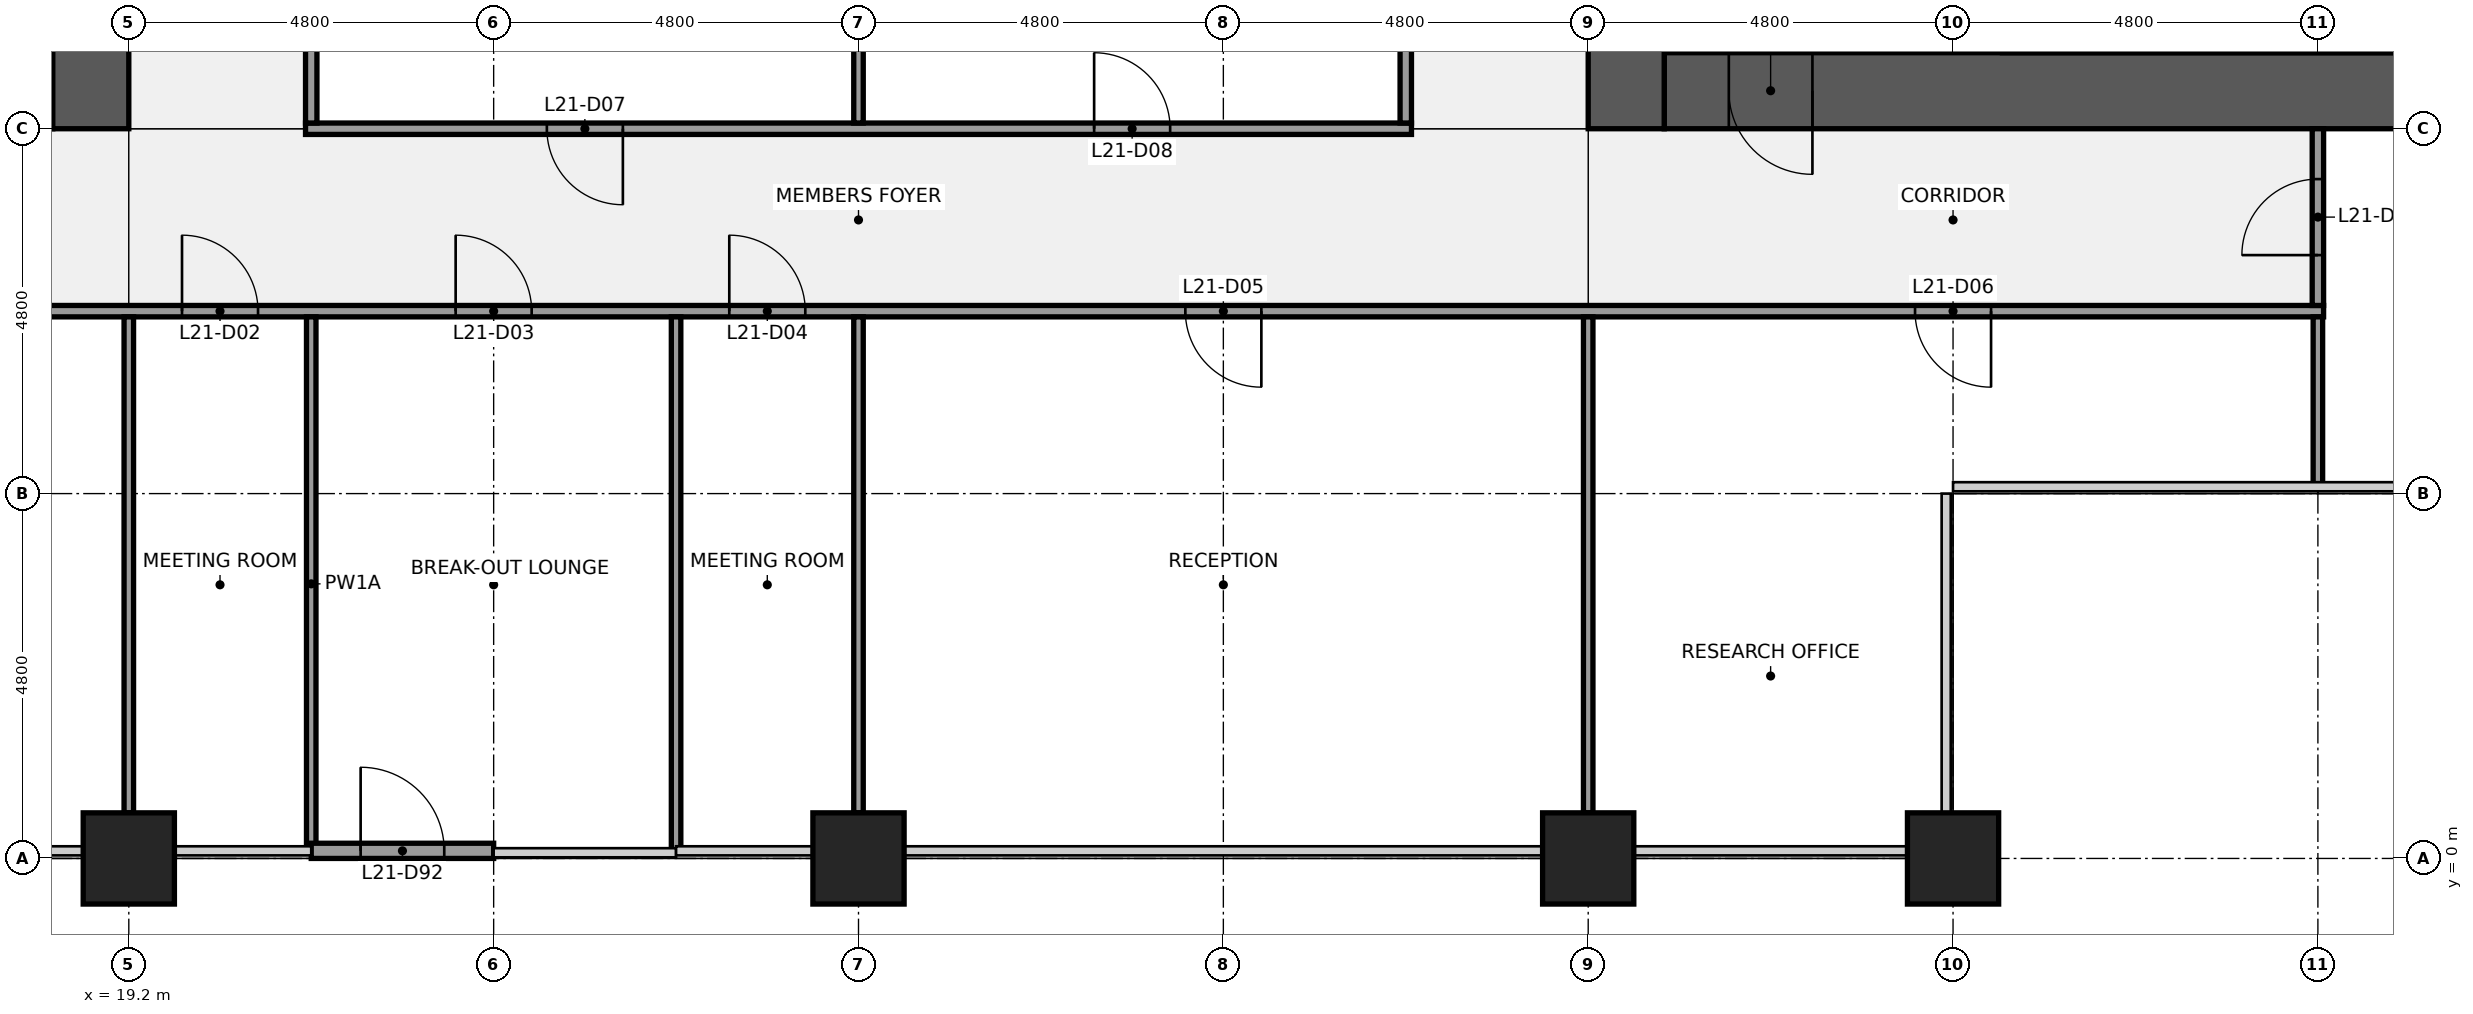
"""IFC4 building model, lengths in metres.
Left out: names, types, materials, properties, quantities, classifications, styles, units other than length and angle.
Written with IfcOpenShell. Run it as: python <this file> out.ifc"""

import sys

from ifc_helpers import new_model, si_unit, direction, frame, frame_2d, origin, origin_2d, place, context, subcontext, project, spatial, rectangle, extrude, element, fill, save


model = new_model("IFC4")
c1 = context("Model", 3, precision=1e-05, world=origin(), true_north=direction((0.0, 1.0)))
c2 = subcontext(c1, "Body", "Model", "MODEL_VIEW")
j1 = project(units=[si_unit("LENGTHUNIT", "METRE"), si_unit("PLANEANGLEUNIT", "RADIAN")], contexts=[c1])
p1 = place(None, origin())
s1 = spatial("IfcSite", under=j1, at=p1, CompositionType="ELEMENT")
p2 = place(p1, origin())
s2 = spatial("IfcBuilding", under=s1, at=p2, CompositionType="ELEMENT")
p3 = place(p2, frame((0.0, 0.0, 104.1)))
s3 = spatial("IfcBuildingStorey", under=s2, at=p3, CompositionType="ELEMENT", Elevation=104.1)
for number, where, z_axis, x_axis in (
    (1, (19.2, 0.0, 0.0), (0.0, 0.0, 1.0), (1.0, 0.0, 0.0)),
    (2, (28.8, 0.0, 0.0), (0.0, 0.0, 1.0), (1.0, 0.0, 0.0)),
    (3, (38.4, 0.0, 0.0), (0.0, 0.0, 1.0), (1.0, 0.0, 0.0)),
    (4, (43.2, 0.0, 0.0), (0.0, 0.0, 1.0), (1.0, 0.0, 0.0)),
):
    element("IfcColumn", number, at=place(p3, frame(where, z_axis=z_axis, x_axis=x_axis)), inside=s3, PredefinedType="COLUMN", context=c2, shape_type="SweptSolid", body=[
        extrude(rectangle(XDim=1.2, YDim=1.2, at=origin_2d()), origin(), (0.0, 0.0, 1.0), 4.0),
    ])
p4 = place(p3, frame((18.2, 10.1, 0.0), z_axis=(0.0, 0.0, 1.0), x_axis=(-1.0, 0.0, 0.0)))
e5 = element("IfcWall", 5, at=p4, inside=s3, PredefinedType="SHEAR", context=c2, shape_type="SweptSolid", body=[
    extrude(rectangle(XDim=8.6, YDim=1.0, at=frame_2d((4.3, 0.0))), origin(), (0.0, 0.0, 1.0), 3.84),
])
p5 = place(p4, frame((0.85, 0.0, 0.0)))
e6 = element("IfcOpeningElement", 6, at=p5, cuts=e5, PredefinedType="OPENING", context=c2, shape_type="SweptSolid", body=[
    extrude(rectangle(XDim=1.1, YDim=2.1, at=frame_2d((0.55, 1.05))), frame((0.0, 0.51, 0.0), z_axis=(0.0, -1.0, 0.0), x_axis=(1.0, 0.0, 0.0)), (0.0, 0.0, 1.0), 1.02),
])
p6 = place(p3, frame((18.7, 38.4, 0.0), z_axis=(0.0, 0.0, 1.0), x_axis=(0.0, -1.0, 0.0)))
e7 = element("IfcWall", 7, at=p6, inside=s3, PredefinedType="SHEAR", context=c2, shape_type="SweptSolid", body=[
    extrude(rectangle(XDim=28.8, YDim=1.0, at=frame_2d((14.4, 0.0))), origin(), (0.0, 0.0, 1.0), 3.84),
])
p7 = place(p6, frame((18.3, 0.0, 0.0)))
e8 = element("IfcOpeningElement", 8, at=p7, cuts=e7, PredefinedType="OPENING", context=c2, shape_type="SweptSolid", body=[
    extrude(rectangle(XDim=1.8, YDim=2.1, at=frame_2d((0.9, 1.05))), frame((0.0, 0.51, 0.0), z_axis=(0.0, -1.0, 0.0), x_axis=(1.0, 0.0, 0.0)), (0.0, 0.0, 1.0), 1.02),
])
p8 = place(p6, frame((8.7, 0.0, 0.0)))
e9 = element("IfcOpeningElement", 9, at=p8, cuts=e7, PredefinedType="OPENING", context=c2, shape_type="SweptSolid", body=[
    extrude(rectangle(XDim=1.8, YDim=2.1, at=frame_2d((0.9, 1.05))), frame((0.0, 0.51, 0.0), z_axis=(0.0, -1.0, 0.0), x_axis=(1.0, 0.0, 0.0)), (0.0, 0.0, 1.0), 1.02),
])
p9 = place(p3, frame((52.8, 10.1, 0.0), z_axis=(0.0, 0.0, 1.0), x_axis=(-1.0, 0.0, 0.0)))
e10 = element("IfcWall", 10, at=p9, inside=s3, PredefinedType="SHEAR", context=c2, shape_type="SweptSolid", body=[
    extrude(rectangle(XDim=13.4, YDim=1.0, at=frame_2d((6.7, 0.0))), origin(), (0.0, 0.0, 1.0), 3.84),
])
p10 = place(p9, frame((11.45, 0.0, 0.0)))
e11 = element("IfcOpeningElement", 11, at=p10, cuts=e10, PredefinedType="OPENING", context=c2, shape_type="SweptSolid", body=[
    extrude(rectangle(XDim=1.1, YDim=2.1, at=frame_2d((0.55, 1.05))), frame((0.0, 0.51, 0.0), z_axis=(0.0, -1.0, 0.0), x_axis=(1.0, 0.0, 0.0)), (0.0, 0.0, 1.0), 1.02),
])
p11 = place(p3, frame((38.9, 9.6, 0.0), z_axis=(0.0, 0.0, 1.0), x_axis=(0.0, 1.0, 0.0)))
e12 = element("IfcWall", 12, at=p11, inside=s3, PredefinedType="SHEAR", context=c2, shape_type="SweptSolid", body=[
    extrude(rectangle(XDim=28.8, YDim=1.0, at=frame_2d((14.4, 0.0))), origin(), (0.0, 0.0, 1.0), 3.84),
])
p12 = place(p11, frame((8.7, 0.0, 0.0)))
e13 = element("IfcOpeningElement", 13, at=p12, cuts=e12, PredefinedType="OPENING", context=c2, shape_type="SweptSolid", body=[
    extrude(rectangle(XDim=1.8, YDim=2.1, at=frame_2d((0.9, 1.05))), frame((0.0, 0.51, 0.0), z_axis=(0.0, -1.0, 0.0), x_axis=(1.0, 0.0, 0.0)), (0.0, 0.0, 1.0), 1.02),
])
p13 = place(p11, frame((18.3, 0.0, 0.0)))
e14 = element("IfcOpeningElement", 14, at=p13, cuts=e12, PredefinedType="OPENING", context=c2, shape_type="SweptSolid", body=[
    extrude(rectangle(XDim=1.8, YDim=2.1, at=frame_2d((0.9, 1.05))), frame((0.0, 0.51, 0.0), z_axis=(0.0, -1.0, 0.0), x_axis=(1.0, 0.0, 0.0)), (0.0, 0.0, 1.0), 1.02),
])
p14 = place(p3, frame((43.85, 10.7, 0.0), z_axis=(0.0, 0.0, 1.0), x_axis=(1.0, 0.0, 0.0)))
e15 = element("IfcWall", 15, at=p14, inside=s3, PredefinedType="SHEAR", context=c2, shape_type="SweptSolid", body=[
    extrude(rectangle(XDim=7.5, YDim=0.2, at=frame_2d((3.75, 0.0))), origin(), (0.0, 0.0, 1.0), 3.84),
])
p15 = place(p3, frame((9.7, 7.2, 0.0), z_axis=(0.0, 0.0, 1.0), x_axis=(1.0, 0.0, 0.0)))
e16 = element("IfcWall", 16, at=p15, inside=s3, PredefinedType="PARTITIONING", context=c2, shape_type="SweptSolid", body=[
    extrude(rectangle(XDim=38.375, YDim=0.15, at=frame_2d((19.188, 0.0))), origin(), (0.0, 0.0, 1.0), 2.936),
])
p16 = place(p15, frame((4.25, 0.0, 0.0)))
e17 = element("IfcOpeningElement", 17, at=p16, cuts=e16, PredefinedType="OPENING", context=c2, shape_type="SweptSolid", body=[
    extrude(rectangle(XDim=1.0, YDim=2.1, at=frame_2d((0.5, 1.05))), frame((0.0, 0.085, 0.0), z_axis=(0.0, -1.0, 0.0), x_axis=(1.0, 0.0, 0.0)), (0.0, 0.0, 1.0), 0.17),
])
p17 = place(p15, frame((10.2, 0.0, 0.0)))
e18 = element("IfcOpeningElement", 18, at=p17, cuts=e16, PredefinedType="OPENING", context=c2, shape_type="SweptSolid", body=[
    extrude(rectangle(XDim=1.0, YDim=2.1, at=frame_2d((0.5, 1.05))), frame((0.0, 0.085, 0.0), z_axis=(0.0, -1.0, 0.0), x_axis=(1.0, 0.0, 0.0)), (0.0, 0.0, 1.0), 0.17),
])
p18 = place(p15, frame((13.8, 0.0, 0.0)))
e19 = element("IfcOpeningElement", 19, at=p18, cuts=e16, PredefinedType="OPENING", context=c2, shape_type="SweptSolid", body=[
    extrude(rectangle(XDim=1.0, YDim=2.1, at=frame_2d((0.5, 1.05))), frame((0.0, 0.085, 0.0), z_axis=(0.0, -1.0, 0.0), x_axis=(1.0, 0.0, 0.0)), (0.0, 0.0, 1.0), 0.17),
])
p19 = place(p15, frame((17.4, 0.0, 0.0)))
e20 = element("IfcOpeningElement", 20, at=p19, cuts=e16, PredefinedType="OPENING", context=c2, shape_type="SweptSolid", body=[
    extrude(rectangle(XDim=1.0, YDim=2.1, at=frame_2d((0.5, 1.05))), frame((0.0, 0.085, 0.0), z_axis=(0.0, -1.0, 0.0), x_axis=(1.0, 0.0, 0.0)), (0.0, 0.0, 1.0), 0.17),
])
p20 = place(p15, frame((23.4, 0.0, 0.0)))
e21 = element("IfcOpeningElement", 21, at=p20, cuts=e16, PredefinedType="OPENING", context=c2, shape_type="SweptSolid", body=[
    extrude(rectangle(XDim=1.0, YDim=2.1, at=frame_2d((0.5, 1.05))), frame((0.0, 0.085, 0.0), z_axis=(0.0, -1.0, 0.0), x_axis=(1.0, 0.0, 0.0)), (0.0, 0.0, 1.0), 0.17),
])
p21 = place(p15, frame((33.0, 0.0, 0.0)))
e22 = element("IfcOpeningElement", 22, at=p21, cuts=e16, PredefinedType="OPENING", context=c2, shape_type="SweptSolid", body=[
    extrude(rectangle(XDim=1.0, YDim=2.1, at=frame_2d((0.5, 1.05))), frame((0.0, 0.085, 0.0), z_axis=(0.0, -1.0, 0.0), x_axis=(1.0, 0.0, 0.0)), (0.0, 0.0, 1.0), 0.17),
])
p22 = place(p3, frame((21.525, 9.6, 0.0), z_axis=(0.0, 0.0, 1.0), x_axis=(1.0, 0.0, 0.0)))
e23 = element("IfcWall", 23, at=p22, inside=s3, PredefinedType="PARTITIONING", context=c2, shape_type="SweptSolid", body=[
    extrude(rectangle(XDim=14.55, YDim=0.15, at=frame_2d((7.275, 0.0))), origin(), (0.0, 0.0, 1.0), 2.936),
])
p23 = place(p22, frame((3.175, 0.0, 0.0)))
e24 = element("IfcOpeningElement", 24, at=p23, cuts=e23, PredefinedType="OPENING", context=c2, shape_type="SweptSolid", body=[
    extrude(rectangle(XDim=1.0, YDim=2.1, at=frame_2d((0.5, 1.05))), frame((0.0, 0.085, 0.0), z_axis=(0.0, -1.0, 0.0), x_axis=(1.0, 0.0, 0.0)), (0.0, 0.0, 1.0), 0.17),
])
p24 = place(p22, frame((10.375, 0.0, 0.0)))
e25 = element("IfcOpeningElement", 25, at=p24, cuts=e23, PredefinedType="OPENING", context=c2, shape_type="SweptSolid", body=[
    extrude(rectangle(XDim=1.0, YDim=2.1, at=frame_2d((0.5, 1.05))), frame((0.0, 0.085, 0.0), z_axis=(0.0, -1.0, 0.0), x_axis=(1.0, 0.0, 0.0)), (0.0, 0.0, 1.0), 0.17),
])
p25 = place(p3, frame((19.2, 0.6, 0.0), z_axis=(0.0, 0.0, 1.0), x_axis=(0.0, 1.0, 0.0)))
e26 = element("IfcWall", 26, at=p25, inside=s3, PredefinedType="PARTITIONING", context=c2, shape_type="SweptSolid", body=[
    extrude(rectangle(XDim=6.525, YDim=0.125, at=frame_2d((3.262, 0.0))), origin(), (0.0, 0.0, 1.0), 2.936),
])
p26 = place(p3, frame((21.6, 0.1, 0.0), z_axis=(0.0, 0.0, 1.0), x_axis=(0.0, 1.0, 0.0)))
e27 = element("IfcWall", 27, at=p26, inside=s3, PredefinedType="PARTITIONING", context=c2, shape_type="SweptSolid", body=[
    extrude(rectangle(XDim=7.025, YDim=0.125, at=frame_2d((3.512, 0.0))), origin(), (0.0, 0.0, 1.0), 2.936),
])
p27 = place(p3, frame((21.6, 9.675, 0.0), z_axis=(0.0, 0.0, 1.0), x_axis=(0.0, 1.0, 0.0)))
e28 = element("IfcWall", 28, at=p27, inside=s3, PredefinedType="PARTITIONING", context=c2, shape_type="SweptSolid", body=[
    extrude(rectangle(XDim=4.65, YDim=0.15, at=frame_2d((2.325, 0.0))), origin(), (0.0, 0.0, 1.0), 2.936),
])
p28 = place(p3, frame((26.4, 0.1, 0.0), z_axis=(0.0, 0.0, 1.0), x_axis=(0.0, 1.0, 0.0)))
e29 = element("IfcWall", 29, at=p28, inside=s3, PredefinedType="PARTITIONING", context=c2, shape_type="SweptSolid", body=[
    extrude(rectangle(XDim=7.025, YDim=0.125, at=frame_2d((3.512, 0.0))), origin(), (0.0, 0.0, 1.0), 2.936),
])
p29 = place(p3, frame((28.8, 0.6, 0.0), z_axis=(0.0, 0.0, 1.0), x_axis=(0.0, 1.0, 0.0)))
e30 = element("IfcWall", 30, at=p29, inside=s3, PredefinedType="PARTITIONING", context=c2, shape_type="SweptSolid", body=[
    extrude(rectangle(XDim=6.525, YDim=0.125, at=frame_2d((3.262, 0.0))), origin(), (0.0, 0.0, 1.0), 2.936),
])
p30 = place(p3, frame((28.8, 9.675, 0.0), z_axis=(0.0, 0.0, 1.0), x_axis=(0.0, 1.0, 0.0)))
e31 = element("IfcWall", 31, at=p30, inside=s3, PredefinedType="PARTITIONING", context=c2, shape_type="SweptSolid", body=[
    extrude(rectangle(XDim=4.662, YDim=0.125, at=frame_2d((2.331, 0.0))), origin(), (0.0, 0.0, 1.0), 2.936),
])
p31 = place(p3, frame((36.0, 9.675, 0.0), z_axis=(0.0, 0.0, 1.0), x_axis=(0.0, 1.0, 0.0)))
e32 = element("IfcWall", 32, at=p31, inside=s3, PredefinedType="PARTITIONING", context=c2, shape_type="SweptSolid", body=[
    extrude(rectangle(XDim=4.65, YDim=0.15, at=frame_2d((2.325, 0.0))), origin(), (0.0, 0.0, 1.0), 2.936),
])
p32 = place(p3, frame((38.4, 0.6, 0.0), z_axis=(0.0, 0.0, 1.0), x_axis=(0.0, 1.0, 0.0)))
e33 = element("IfcWall", 33, at=p32, inside=s3, PredefinedType="PARTITIONING", context=c2, shape_type="SweptSolid", body=[
    extrude(rectangle(XDim=6.525, YDim=0.125, at=frame_2d((3.262, 0.0))), origin(), (0.0, 0.0, 1.0), 2.936),
])
p33 = place(p3, frame((48.0, 4.9, 0.0), z_axis=(0.0, 0.0, 1.0), x_axis=(0.0, 1.0, 0.0)))
e34 = element("IfcWall", 34, at=p33, inside=s3, PredefinedType="PARTITIONING", context=c2, shape_type="SweptSolid", body=[
    extrude(rectangle(XDim=2.225, YDim=0.125, at=frame_2d((1.113, 0.0))), origin(), (0.0, 0.0, 1.0), 2.936),
])
p34 = place(p3, frame((48.0, 7.275, 0.0), z_axis=(0.0, 0.0, 1.0), x_axis=(0.0, 1.0, 0.0)))
e35 = element("IfcWall", 35, at=p34, inside=s3, PredefinedType="PARTITIONING", context=c2, shape_type="SweptSolid", body=[
    extrude(rectangle(XDim=2.325, YDim=0.15, at=frame_2d((1.163, 0.0))), origin(), (0.0, 0.0, 1.0), 2.936),
])
p35 = place(p34, frame((0.663, 0.0, 0.0)))
e36 = element("IfcOpeningElement", 36, at=p35, cuts=e35, PredefinedType="OPENING", context=c2, shape_type="SweptSolid", body=[
    extrude(rectangle(XDim=1.0, YDim=2.1, at=frame_2d((0.5, 1.05))), frame((0.0, 0.085, 0.0), z_axis=(0.0, -1.0, 0.0), x_axis=(1.0, 0.0, 0.0)), (0.0, 0.0, 1.0), 0.17),
])
p36 = place(p3, frame((21.6, 0.1, 0.0), z_axis=(0.0, 0.0, 1.0), x_axis=(1.0, 0.0, 0.0)))
e37 = element("IfcWall", 37, at=p36, inside=s3, PredefinedType="SOLIDWALL", context=c2, shape_type="SweptSolid", body=[
    extrude(rectangle(XDim=2.4, YDim=0.2, at=frame_2d((1.2, 0.0))), origin(), (0.0, 0.0, 1.0), 3.314),
])
p37 = place(p36, frame((0.65, 0.0, 0.0)))
e38 = element("IfcOpeningElement", 38, at=p37, cuts=e37, PredefinedType="OPENING", context=c2, shape_type="SweptSolid", body=[
    extrude(rectangle(XDim=1.1, YDim=2.1, at=frame_2d((0.55, 1.05))), frame((0.0, 0.11, 0.0), z_axis=(0.0, -1.0, 0.0), x_axis=(1.0, 0.0, 0.0)), (0.0, 0.0, 1.0), 0.22),
])
for number, where, z_axis, x_axis in (
    (39, (19.2, -1.05, 0.0), (0.0, 0.0, 1.0), (1.0, 0.0, 0.0)),
    (40, (38.4, -1.05, 0.0), (0.0, 0.0, 1.0), (1.0, 0.0, 0.0)),
    (41, (43.2, -1.05, 0.0), (0.0, 0.0, 1.0), (1.0, 0.0, 0.0)),
):
    element("IfcColumn", number, at=place(p3, frame(where, z_axis=z_axis, x_axis=x_axis)), inside=s3, PredefinedType="PILASTER", context=c2, shape_type="SweptSolid", body=[
        extrude(rectangle(XDim=3.6, YDim=0.9, at=origin_2d()), origin(), (0.0, 0.0, 1.0), 4.0),
    ])
p38 = place(p10, origin())
e42 = element("IfcDoor", 42, at=p38, inside=s3, OperationType="SINGLE_SWING_LEFT", PredefinedType="DOOR", context=c2, shape_type="SweptSolid", body=[
    extrude(rectangle(XDim=1.1, YDim=2.1, at=frame_2d((0.55, 1.05))), frame((0.0, 0.025, 0.0), z_axis=(0.0, -1.0, 0.0), x_axis=(1.0, 0.0, 0.0)), (0.0, 0.0, 1.0), 0.05),
])
fill(e11, e42)
p39 = place(p17, origin())
e43 = element("IfcDoor", 43, at=p39, inside=s3, OperationType="SINGLE_SWING_LEFT", PredefinedType="DOOR", context=c2, shape_type="SweptSolid", body=[
    extrude(rectangle(XDim=1.0, YDim=2.1, at=frame_2d((0.5, 1.05))), frame((0.0, 0.025, 0.0), z_axis=(0.0, -1.0, 0.0), x_axis=(1.0, 0.0, 0.0)), (0.0, 0.0, 1.0), 0.05),
])
fill(e18, e43)
p40 = place(p18, origin())
e44 = element("IfcDoor", 44, at=p40, inside=s3, OperationType="SINGLE_SWING_LEFT", PredefinedType="DOOR", context=c2, shape_type="SweptSolid", body=[
    extrude(rectangle(XDim=1.0, YDim=2.1, at=frame_2d((0.5, 1.05))), frame((0.0, 0.025, 0.0), z_axis=(0.0, -1.0, 0.0), x_axis=(1.0, 0.0, 0.0)), (0.0, 0.0, 1.0), 0.05),
])
fill(e19, e44)
p41 = place(p19, origin())
e45 = element("IfcDoor", 45, at=p41, inside=s3, OperationType="SINGLE_SWING_LEFT", PredefinedType="DOOR", context=c2, shape_type="SweptSolid", body=[
    extrude(rectangle(XDim=1.0, YDim=2.1, at=frame_2d((0.5, 1.05))), frame((0.0, 0.025, 0.0), z_axis=(0.0, -1.0, 0.0), x_axis=(1.0, 0.0, 0.0)), (0.0, 0.0, 1.0), 0.05),
])
fill(e20, e45)
p42 = place(p20, origin())
e46 = element("IfcDoor", 46, at=p42, inside=s3, OperationType="SINGLE_SWING_RIGHT", PredefinedType="DOOR", context=c2, shape_type="SweptSolid", body=[
    extrude(rectangle(XDim=1.0, YDim=2.1, at=frame_2d((0.5, 1.05))), frame((0.0, 0.025, 0.0), z_axis=(0.0, -1.0, 0.0), x_axis=(1.0, 0.0, 0.0)), (0.0, 0.0, 1.0), 0.05),
])
fill(e21, e46)
p43 = place(p21, origin())
e47 = element("IfcDoor", 47, at=p43, inside=s3, OperationType="SINGLE_SWING_RIGHT", PredefinedType="DOOR", context=c2, shape_type="SweptSolid", body=[
    extrude(rectangle(XDim=1.0, YDim=2.1, at=frame_2d((0.5, 1.05))), frame((0.0, 0.025, 0.0), z_axis=(0.0, -1.0, 0.0), x_axis=(1.0, 0.0, 0.0)), (0.0, 0.0, 1.0), 0.05),
])
fill(e22, e47)
p44 = place(p23, origin())
e48 = element("IfcDoor", 48, at=p44, inside=s3, OperationType="SINGLE_SWING_RIGHT", PredefinedType="DOOR", context=c2, shape_type="SweptSolid", body=[
    extrude(rectangle(XDim=1.0, YDim=2.1, at=frame_2d((0.5, 1.05))), frame((0.0, 0.025, 0.0), z_axis=(0.0, -1.0, 0.0), x_axis=(1.0, 0.0, 0.0)), (0.0, 0.0, 1.0), 0.05),
])
fill(e24, e48)
p45 = place(p24, origin())
e49 = element("IfcDoor", 49, at=p45, inside=s3, OperationType="SINGLE_SWING_LEFT", PredefinedType="DOOR", context=c2, shape_type="SweptSolid", body=[
    extrude(rectangle(XDim=1.0, YDim=2.1, at=frame_2d((0.5, 1.05))), frame((0.0, 0.025, 0.0), z_axis=(0.0, -1.0, 0.0), x_axis=(1.0, 0.0, 0.0)), (0.0, 0.0, 1.0), 0.05),
])
fill(e25, e49)
p46 = place(p35, origin())
e50 = element("IfcDoor", 50, at=p46, inside=s3, OperationType="SINGLE_SWING_LEFT", PredefinedType="DOOR", context=c2, shape_type="SweptSolid", body=[
    extrude(rectangle(XDim=1.0, YDim=2.1, at=frame_2d((0.5, 1.05))), frame((0.0, 0.025, 0.0), z_axis=(0.0, -1.0, 0.0), x_axis=(1.0, 0.0, 0.0)), (0.0, 0.0, 1.0), 0.05),
])
fill(e36, e50)
p47 = place(p37, origin())
e51 = element("IfcDoor", 51, at=p47, inside=s3, OperationType="SINGLE_SWING_LEFT", PredefinedType="DOOR", context=c2, shape_type="SweptSolid", body=[
    extrude(rectangle(XDim=1.1, YDim=2.1, at=frame_2d((0.55, 1.05))), frame((0.0, 0.025, 0.0), z_axis=(0.0, -1.0, 0.0), x_axis=(1.0, 0.0, 0.0)), (0.0, 0.0, 1.0), 0.05),
])
fill(e38, e51)
save(model, sys.argv[1])
